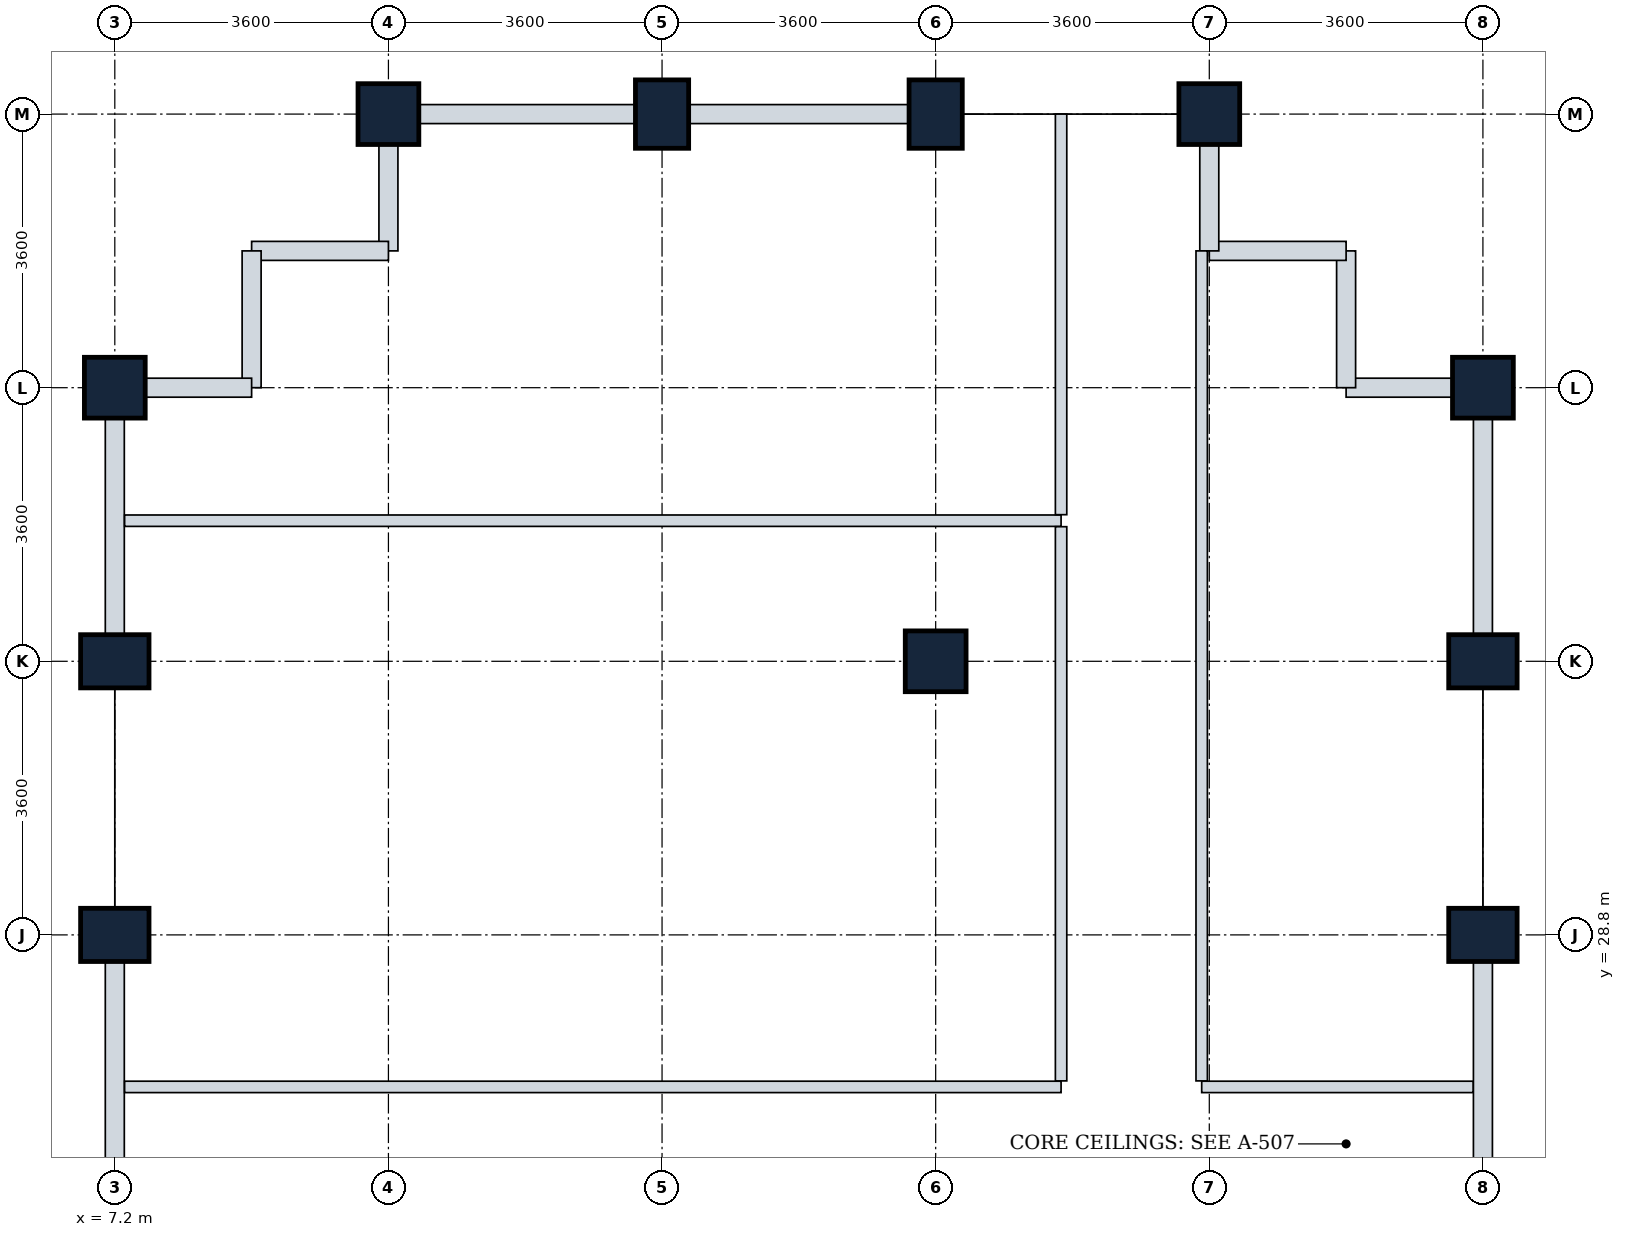
"""IFC4 building model, lengths in metres.
Left out: names, types, materials, properties, quantities, classifications, styles, units other than length and angle.
Written with IfcOpenShell. Run it as: python <this file> out.ifc"""

import sys

from ifc_helpers import new_model, si_unit, direction, frame, frame_2d, origin, origin_2d, place, context, subcontext, project, spatial, rectangle, extrude, element, fill, save


model = new_model("IFC4")
c1 = context("Model", 3, precision=1e-05, world=origin(), true_north=direction((0.0, 1.0)))
c2 = subcontext(c1, "Body", "Model", "MODEL_VIEW")
j1 = project(units=[si_unit("LENGTHUNIT", "METRE"), si_unit("PLANEANGLEUNIT", "RADIAN")], contexts=[c1])
p1 = place(None, origin())
s1 = spatial("IfcSite", under=j1, at=p1, CompositionType="ELEMENT")
p2 = place(p1, origin())
s2 = spatial("IfcBuilding", under=s1, at=p2, CompositionType="ELEMENT")
p3 = place(p2, frame((0.0, 0.0, 209.0)))
s3 = spatial("IfcBuildingStorey", under=s2, at=p3, CompositionType="ELEMENT", Elevation=209.0)
for number, where, z_axis, x_axis in (
    (1, (7.2, 28.8, 0.0), (0.0, 0.0, 1.0), (0.0, 1.0, 0.0)),
    (2, (7.2, 32.4, 0.0), (0.0, 0.0, 1.0), (0.0, 1.0, 0.0)),
):
    element("IfcColumn", number, at=place(p3, frame(where, z_axis=z_axis, x_axis=x_axis)), inside=s3, PredefinedType="COLUMN", context=c2, shape_type="SweptSolid", body=[
        extrude(rectangle(XDim=0.7, YDim=0.9, at=origin_2d()), origin(), (0.0, 0.0, 1.0), 4.8),
    ])
for number, where, z_axis, x_axis in (
    (3, (7.2, 36.0, 0.0), (0.0, 0.0, 1.0), (0.0, 1.0, 0.0)),
    (4, (10.8, 39.6, 0.0), (0.0, 0.0, 1.0), (1.0, 0.0, 0.0)),
):
    element("IfcColumn", number, at=place(p3, frame(where, z_axis=z_axis, x_axis=x_axis)), inside=s3, PredefinedType="COLUMN", context=c2, shape_type="SweptSolid", body=[
        extrude(rectangle(XDim=0.8, YDim=0.8, at=origin_2d()), origin(), (0.0, 0.0, 1.0), 4.8),
    ])
p4 = place(p3, frame((14.4, 39.6, 0.0), z_axis=(0.0, 0.0, 1.0), x_axis=(1.0, 0.0, 0.0)))
e5 = element("IfcColumn", 5, at=p4, inside=s3, PredefinedType="COLUMN", context=c2, shape_type="SweptSolid", body=[
    extrude(rectangle(XDim=0.7, YDim=0.9, at=origin_2d()), origin(), (0.0, 0.0, 1.0), 4.8),
])
p5 = place(p3, frame((18.0, 32.4, 0.0), z_axis=(0.0, 0.0, 1.0), x_axis=(1.0, 0.0, 0.0)))
e6 = element("IfcColumn", 6, at=p5, inside=s3, PredefinedType="COLUMN", context=c2, shape_type="SweptSolid", body=[
    extrude(rectangle(XDim=0.8, YDim=0.8, at=origin_2d()), origin(), (0.0, 0.0, 1.0), 4.8),
])
p6 = place(p3, frame((18.0, 39.6, 0.0), z_axis=(0.0, 0.0, 1.0), x_axis=(1.0, 0.0, 0.0)))
e7 = element("IfcColumn", 7, at=p6, inside=s3, PredefinedType="COLUMN", context=c2, shape_type="SweptSolid", body=[
    extrude(rectangle(XDim=0.7, YDim=0.9, at=origin_2d()), origin(), (0.0, 0.0, 1.0), 4.8),
])
p7 = place(p3, frame((21.6, 39.6, 0.0), z_axis=(0.0, 0.0, 1.0), x_axis=(1.0, 0.0, 0.0)))
e8 = element("IfcColumn", 8, at=p7, inside=s3, PredefinedType="COLUMN", context=c2, shape_type="SweptSolid", body=[
    extrude(rectangle(XDim=0.8, YDim=0.8, at=origin_2d()), origin(), (0.0, 0.0, 1.0), 4.8),
])
for number, where, z_axis, x_axis in (
    (9, (25.2, 28.8, 0.0), (0.0, 0.0, 1.0), (0.0, 1.0, 0.0)),
    (10, (25.2, 32.4, 0.0), (0.0, 0.0, 1.0), (0.0, 1.0, 0.0)),
):
    element("IfcColumn", number, at=place(p3, frame(where, z_axis=z_axis, x_axis=x_axis)), inside=s3, PredefinedType="COLUMN", context=c2, shape_type="SweptSolid", body=[
        extrude(rectangle(XDim=0.7, YDim=0.9, at=origin_2d()), origin(), (0.0, 0.0, 1.0), 4.8),
    ])
p8 = place(p3, frame((25.2, 36.0, 0.0), z_axis=(0.0, 0.0, 1.0), x_axis=(0.0, 1.0, 0.0)))
e11 = element("IfcColumn", 11, at=p8, inside=s3, PredefinedType="COLUMN", context=c2, shape_type="SweptSolid", body=[
    extrude(rectangle(XDim=0.8, YDim=0.8, at=origin_2d()), origin(), (0.0, 0.0, 1.0), 4.8),
])
p9 = place(p3, frame((25.2, 25.2, 0.0), z_axis=(0.0, 0.0, 1.0), x_axis=(0.0, 1.0, 0.0)))
e12 = element("IfcWall", 12, at=p9, inside=s3, PredefinedType="STANDARD", context=c2, shape_type="SweptSolid", body=[
    extrude(rectangle(XDim=3.6, YDim=0.25, at=frame_2d((1.8, 0.0))), origin(), (0.0, 0.0, 1.0), 3.93),
])
p10 = place(p3, frame((25.2, 32.4, 0.0), z_axis=(0.0, 0.0, 1.0), x_axis=(0.0, 1.0, 0.0)))
e13 = element("IfcWall", 13, at=p10, inside=s3, PredefinedType="STANDARD", context=c2, shape_type="SweptSolid", body=[
    extrude(rectangle(XDim=3.6, YDim=0.25, at=frame_2d((1.8, 0.0))), origin(), (0.0, 0.0, 1.0), 3.93),
])
p11 = place(p10, frame((0.775, 0.0, 0.85)))
e14 = element("IfcOpeningElement", 14, at=p11, cuts=e13, PredefinedType="OPENING", context=c2, shape_type="SweptSolid", body=[
    extrude(rectangle(XDim=2.1, YDim=1.35, at=frame_2d((1.05, 0.675))), frame((0.0, 0.135, 0.0), z_axis=(0.0, -1.0, 0.0), x_axis=(1.0, 0.0, 0.0)), (0.0, 0.0, 1.0), 0.27),
])
p12 = place(p3, frame((23.4, 36.0, 0.0), z_axis=(0.0, 0.0, 1.0), x_axis=(1.0, 0.0, 0.0)))
e15 = element("IfcWall", 15, at=p12, inside=s3, PredefinedType="STANDARD", context=c2, shape_type="SweptSolid", body=[
    extrude(rectangle(XDim=1.8, YDim=0.25, at=frame_2d((0.9, 0.0))), origin(), (0.0, 0.0, 1.0), 3.93),
])
p13 = place(p3, frame((23.4, 36.0, 0.0), z_axis=(0.0, 0.0, 1.0), x_axis=(0.0, 1.0, 0.0)))
e16 = element("IfcWall", 16, at=p13, inside=s3, PredefinedType="STANDARD", context=c2, shape_type="SweptSolid", body=[
    extrude(rectangle(XDim=1.8, YDim=0.25, at=frame_2d((0.9, 0.0))), origin(), (0.0, 0.0, 1.0), 4.535),
])
p14 = place(p3, frame((21.6, 37.8, 0.0), z_axis=(0.0, 0.0, 1.0), x_axis=(1.0, 0.0, 0.0)))
e17 = element("IfcWall", 17, at=p14, inside=s3, PredefinedType="STANDARD", context=c2, shape_type="SweptSolid", body=[
    extrude(rectangle(XDim=1.8, YDim=0.25, at=frame_2d((0.9, 0.0))), origin(), (0.0, 0.0, 1.0), 4.535),
])
p15 = place(p3, frame((21.6, 37.8, 0.0), z_axis=(0.0, 0.0, 1.0), x_axis=(0.0, 1.0, 0.0)))
e18 = element("IfcWall", 18, at=p15, inside=s3, PredefinedType="STANDARD", context=c2, shape_type="SweptSolid", body=[
    extrude(rectangle(XDim=1.8, YDim=0.25, at=frame_2d((0.9, 0.0))), origin(), (0.0, 0.0, 1.0), 3.93),
])
p16 = place(p3, frame((14.4, 39.6, 0.0), z_axis=(0.0, 0.0, 1.0), x_axis=(1.0, 0.0, 0.0)))
e19 = element("IfcWall", 19, at=p16, inside=s3, PredefinedType="STANDARD", context=c2, shape_type="SweptSolid", body=[
    extrude(rectangle(XDim=3.6, YDim=0.25, at=frame_2d((1.8, 0.0))), origin(), (0.0, 0.0, 1.0), 3.93),
])
p17 = place(p16, frame((0.75, 0.0, 0.85)))
e20 = element("IfcOpeningElement", 20, at=p17, cuts=e19, PredefinedType="OPENING", context=c2, shape_type="SweptSolid", body=[
    extrude(rectangle(XDim=2.1, YDim=1.35, at=frame_2d((1.05, 0.675))), frame((0.0, 0.135, 0.0), z_axis=(0.0, -1.0, 0.0), x_axis=(1.0, 0.0, 0.0)), (0.0, 0.0, 1.0), 0.27),
])
p18 = place(p3, frame((10.8, 39.6, 0.0), z_axis=(0.0, 0.0, 1.0), x_axis=(1.0, 0.0, 0.0)))
e21 = element("IfcWall", 21, at=p18, inside=s3, PredefinedType="STANDARD", context=c2, shape_type="SweptSolid", body=[
    extrude(rectangle(XDim=3.6, YDim=0.25, at=frame_2d((1.8, 0.0))), origin(), (0.0, 0.0, 1.0), 3.93),
])
p19 = place(p3, frame((10.8, 37.8, 0.0), z_axis=(0.0, 0.0, 1.0), x_axis=(0.0, 1.0, 0.0)))
e22 = element("IfcWall", 22, at=p19, inside=s3, PredefinedType="STANDARD", context=c2, shape_type="SweptSolid", body=[
    extrude(rectangle(XDim=1.8, YDim=0.25, at=frame_2d((0.9, 0.0))), origin(), (0.0, 0.0, 1.0), 3.93),
])
for number, where, z_axis, x_axis in (
    (23, (9.0, 37.8, 0.0), (0.0, 0.0, 1.0), (1.0, 0.0, 0.0)),
    (24, (9.0, 36.0, 0.0), (0.0, 0.0, 1.0), (0.0, 1.0, 0.0)),
):
    element("IfcWall", number, at=place(p3, frame(where, z_axis=z_axis, x_axis=x_axis)), inside=s3, PredefinedType="STANDARD", context=c2, shape_type="SweptSolid", body=[
        extrude(rectangle(XDim=1.8, YDim=0.25, at=frame_2d((0.9, 0.0))), origin(), (0.0, 0.0, 1.0), 4.535),
    ])
p20 = place(p3, frame((7.2, 36.0, 0.0), z_axis=(0.0, 0.0, 1.0), x_axis=(1.0, 0.0, 0.0)))
e25 = element("IfcWall", 25, at=p20, inside=s3, PredefinedType="STANDARD", context=c2, shape_type="SweptSolid", body=[
    extrude(rectangle(XDim=1.8, YDim=0.25, at=frame_2d((0.9, 0.0))), origin(), (0.0, 0.0, 1.0), 3.93),
])
for number, where, z_axis, x_axis in (
    (26, (7.2, 32.4, 0.0), (0.0, 0.0, 1.0), (0.0, 1.0, 0.0)),
    (27, (7.2, 25.2, 0.0), (0.0, 0.0, 1.0), (0.0, 1.0, 0.0)),
):
    element("IfcWall", number, at=place(p3, frame(where, z_axis=z_axis, x_axis=x_axis)), inside=s3, PredefinedType="STANDARD", context=c2, shape_type="SweptSolid", body=[
        extrude(rectangle(XDim=3.6, YDim=0.25, at=frame_2d((1.8, 0.0))), origin(), (0.0, 0.0, 1.0), 3.93),
    ])
for number, where, z_axis, x_axis in (
    (28, (7.329, 26.8, 0.0), (0.0, 0.0, 1.0), (1.0, 0.0, 0.0)),
    (29, (7.329, 34.25, 0.0), (0.0, 0.0, 1.0), (1.0, 0.0, 0.0)),
):
    element("IfcWall", number, at=place(p3, frame(where, z_axis=z_axis, x_axis=x_axis)), inside=s3, PredefinedType="PARTITIONING", context=c2, shape_type="SweptSolid", body=[
        extrude(rectangle(XDim=12.321, YDim=0.15, at=frame_2d((6.16, 0.0))), origin(), (0.0, 0.0, 1.0), 3.93),
    ])
p21 = place(p3, frame((19.65, 26.879, 0.0), z_axis=(0.0, 0.0, 1.0), x_axis=(0.0, 1.0, 0.0)))
e30 = element("IfcWall", 30, at=p21, inside=s3, PredefinedType="PARTITIONING", context=c2, shape_type="SweptSolid", body=[
    extrude(rectangle(XDim=7.292, YDim=0.15, at=frame_2d((3.646, 0.0))), origin(), (0.0, 0.0, 1.0), 4.23),
])
p22 = place(p21, frame((1.793, 0.0, 0.0)))
e31 = element("IfcOpeningElement", 31, at=p22, cuts=e30, PredefinedType="OPENING", context=c2, shape_type="SweptSolid", body=[
    extrude(rectangle(XDim=1.0, YDim=2.1, at=frame_2d((0.5, 1.05))), frame((0.0, 0.085, 0.0), z_axis=(0.0, -1.0, 0.0), x_axis=(1.0, 0.0, 0.0)), (0.0, 0.0, 1.0), 0.17),
])
p23 = place(p3, frame((19.65, 34.329, 0.0), z_axis=(0.0, 0.0, 1.0), x_axis=(0.0, 1.0, 0.0)))
e32 = element("IfcWall", 32, at=p23, inside=s3, PredefinedType="PARTITIONING", context=c2, shape_type="SweptSolid", body=[
    extrude(rectangle(XDim=5.271, YDim=0.15, at=frame_2d((2.635, 0.0))), origin(), (0.0, 0.0, 1.0), 3.93),
])
p24 = place(p23, frame((1.465, 0.0, 0.0)))
e33 = element("IfcOpeningElement", 33, at=p24, cuts=e32, PredefinedType="OPENING", context=c2, shape_type="SweptSolid", body=[
    extrude(rectangle(XDim=1.0, YDim=2.1, at=frame_2d((0.5, 1.05))), frame((0.0, 0.085, 0.0), z_axis=(0.0, -1.0, 0.0), x_axis=(1.0, 0.0, 0.0)), (0.0, 0.0, 1.0), 0.17),
])
p25 = place(p3, frame((21.5, 26.8, 0.0), z_axis=(0.0, 0.0, 1.0), x_axis=(1.0, 0.0, 0.0)))
e34 = element("IfcWall", 34, at=p25, inside=s3, PredefinedType="PARTITIONING", context=c2, shape_type="SweptSolid", body=[
    extrude(rectangle(XDim=3.571, YDim=0.15, at=frame_2d((1.786, 0.0))), origin(), (0.0, 0.0, 1.0), 3.93),
])
p26 = place(p3, frame((21.5, 26.879, 0.0), z_axis=(0.0, 0.0, 1.0), x_axis=(0.0, 1.0, 0.0)))
e35 = element("IfcWall", 35, at=p26, inside=s3, PredefinedType="PARTITIONING", context=c2, shape_type="SweptSolid", body=[
    extrude(rectangle(XDim=10.921, YDim=0.15, at=frame_2d((5.46, 0.0))), origin(), (0.0, 0.0, 1.0), 4.2),
])
p27 = place(p26, frame((5.781, 0.0, 0.0)))
e36 = element("IfcOpeningElement", 36, at=p27, cuts=e35, PredefinedType="OPENING", context=c2, shape_type="SweptSolid", body=[
    extrude(rectangle(XDim=1.0, YDim=2.1, at=frame_2d((0.5, 1.05))), frame((0.0, 0.085, 0.0), z_axis=(0.0, -1.0, 0.0), x_axis=(1.0, 0.0, 0.0)), (0.0, 0.0, 1.0), 0.17),
])
p28 = place(p11, origin())
e37 = element("IfcWindow", 37, at=p28, inside=s3, PartitioningType="SINGLE_PANEL", PredefinedType="WINDOW", context=c2, shape_type="SweptSolid", body=[
    extrude(rectangle(XDim=2.1, YDim=1.35, at=frame_2d((1.05, 0.675))), frame((0.0, 0.03, 0.0), z_axis=(0.0, -1.0, 0.0), x_axis=(1.0, 0.0, 0.0)), (0.0, 0.0, 1.0), 0.06),
])
fill(e14, e37)
p29 = place(p17, origin())
e38 = element("IfcWindow", 38, at=p29, inside=s3, PartitioningType="SINGLE_PANEL", PredefinedType="WINDOW", context=c2, shape_type="SweptSolid", body=[
    extrude(rectangle(XDim=2.1, YDim=1.35, at=frame_2d((1.05, 0.675))), frame((0.0, 0.03, 0.0), z_axis=(0.0, -1.0, 0.0), x_axis=(1.0, 0.0, 0.0)), (0.0, 0.0, 1.0), 0.06),
])
fill(e20, e38)
p30 = place(p22, origin())
e39 = element("IfcDoor", 39, at=p30, inside=s3, OperationType="SINGLE_SWING_RIGHT", PredefinedType="DOOR", context=c2, shape_type="SweptSolid", body=[
    extrude(rectangle(XDim=1.0, YDim=2.1, at=frame_2d((0.5, 1.05))), frame((0.0, 0.025, 0.0), z_axis=(0.0, -1.0, 0.0), x_axis=(1.0, 0.0, 0.0)), (0.0, 0.0, 1.0), 0.05),
])
fill(e31, e39)
p31 = place(p24, origin())
e40 = element("IfcDoor", 40, at=p31, inside=s3, OperationType="SINGLE_SWING_RIGHT", PredefinedType="DOOR", context=c2, shape_type="SweptSolid", body=[
    extrude(rectangle(XDim=1.0, YDim=2.1, at=frame_2d((0.5, 1.05))), frame((0.0, 0.025, 0.0), z_axis=(0.0, -1.0, 0.0), x_axis=(1.0, 0.0, 0.0)), (0.0, 0.0, 1.0), 0.05),
])
fill(e33, e40)
p32 = place(p27, origin())
e41 = element("IfcDoor", 41, at=p32, inside=s3, OperationType="SINGLE_SWING_LEFT", PredefinedType="DOOR", context=c2, shape_type="SweptSolid", body=[
    extrude(rectangle(XDim=1.0, YDim=2.1, at=frame_2d((0.5, 1.05))), frame((0.0, 0.025, 0.0), z_axis=(0.0, -1.0, 0.0), x_axis=(1.0, 0.0, 0.0)), (0.0, 0.0, 1.0), 0.05),
])
fill(e36, e41)
save(model, sys.argv[1])
